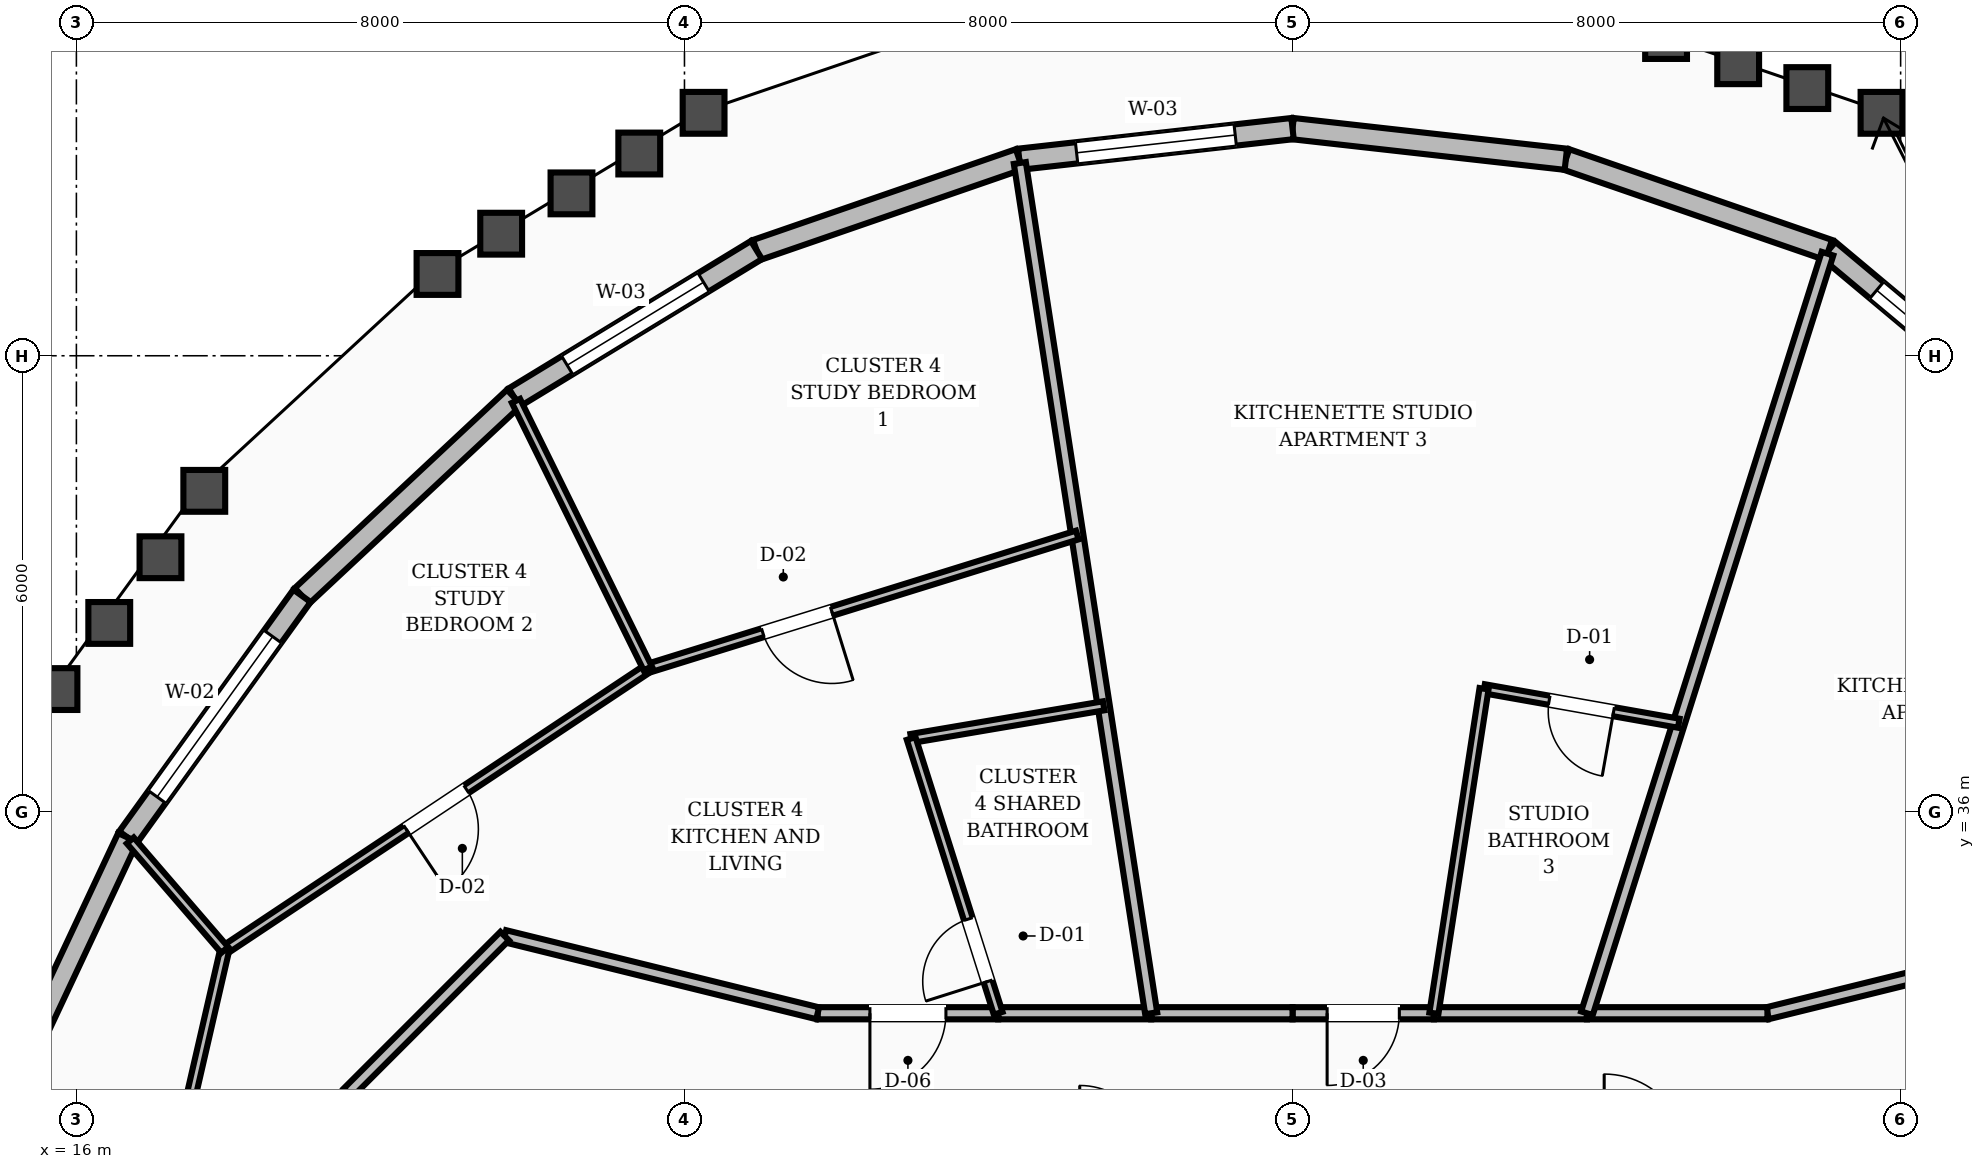
"""IFC4 building model, lengths in metres.
Left out: names, types, materials, properties, quantities, classifications, styles, units other than length and angle.
Written with IfcOpenShell. Run it as: python <this file> out.ifc"""

import sys

from ifc_helpers import new_model, si_unit, direction, frame, frame_2d, origin, place, context, subcontext, project, spatial, rectangle, extrude, element, fill, save


model = new_model("IFC4")
c1 = context("Model", 3, precision=1e-05, world=origin(), true_north=direction((0.0, 1.0)))
c2 = subcontext(c1, "Body", "Model", "MODEL_VIEW")
j1 = project(units=[si_unit("LENGTHUNIT", "METRE"), si_unit("PLANEANGLEUNIT", "RADIAN")], contexts=[c1])
p1 = place(None, origin())
s1 = spatial("IfcSite", under=j1, at=p1, CompositionType="ELEMENT")
p2 = place(p1, origin())
s2 = spatial("IfcBuilding", under=s1, at=p2, CompositionType="ELEMENT")
p3 = place(p2, frame((0.0, 0.0, 283.2)))
s3 = spatial("IfcBuildingStorey", under=s2, at=p3, CompositionType="ELEMENT", Elevation=283.2)
p4 = place(p3, frame((41.999, 40.927, 0.0), z_axis=(0.0, 0.0, 1.0), x_axis=(-0.767031932992, 0.641608925882, 0.0)))
e1 = element("IfcWall", 1, at=p4, inside=s3, PredefinedType="STANDARD", context=c2, shape_type="SweptSolid", body=[
    extrude(rectangle(XDim=3.841, YDim=0.28, at=frame_2d((1.92, 0.0))), origin(), (0.0, 0.0, 1.0), 2.88),
])
p5 = place(p4, frame((0.916, 0.0, 0.8)))
e2 = element("IfcOpeningElement", 2, at=p5, cuts=e1, PredefinedType="OPENING", context=c2, shape_type="SweptSolid", body=[
    extrude(rectangle(XDim=2.1, YDim=1.65, at=frame_2d((1.05, 0.825))), frame((0.0, 0.15, 0.0), z_axis=(0.0, -1.0, 0.0), x_axis=(1.0, 0.0, 0.0)), (0.0, 0.0, 1.0), 0.3),
])
p6 = place(p3, frame((39.053, 43.391, 0.0), z_axis=(0.0, 0.0, 1.0), x_axis=(-0.945189830933, 0.326521336976, 0.0)))
e3 = element("IfcWall", 3, at=p6, inside=s3, PredefinedType="STANDARD", context=c2, shape_type="SweptSolid", body=[
    extrude(rectangle(XDim=3.658, YDim=0.28, at=frame_2d((1.829, 0.0))), origin(), (0.0, 0.0, 1.0), 2.88),
])
p7 = place(p3, frame((35.595, 44.585, 0.0), z_axis=(0.0, 0.0, 1.0), x_axis=(-0.993767154633, 0.111475747909, 0.0)))
e4 = element("IfcWall", 4, at=p7, inside=s3, PredefinedType="STANDARD", context=c2, shape_type="SweptSolid", body=[
    extrude(rectangle(XDim=3.618, YDim=0.28, at=frame_2d((1.809, 0.0))), origin(), (0.0, 0.0, 1.0), 2.88),
])
p8 = place(p3, frame((32.0, 44.989, 0.0), z_axis=(0.0, 0.0, 1.0), x_axis=(-0.993767154633, -0.111475747909, 0.0)))
e5 = element("IfcWall", 5, at=p8, inside=s3, PredefinedType="STANDARD", context=c2, shape_type="SweptSolid", body=[
    extrude(rectangle(XDim=3.618, YDim=0.28, at=frame_2d((1.809, 0.0))), origin(), (0.0, 0.0, 1.0), 2.88),
])
p9 = place(p8, frame((0.759, 0.0, 0.8)))
e6 = element("IfcOpeningElement", 6, at=p9, cuts=e5, PredefinedType="OPENING", context=c2, shape_type="SweptSolid", body=[
    extrude(rectangle(XDim=2.1, YDim=1.65, at=frame_2d((1.05, 0.825))), frame((0.0, 0.15, 0.0), z_axis=(0.0, -1.0, 0.0), x_axis=(1.0, 0.0, 0.0)), (0.0, 0.0, 1.0), 0.3),
])
p10 = place(p3, frame((28.405, 44.585, 0.0), z_axis=(0.0, 0.0, 1.0), x_axis=(-0.945189830933, -0.326521336976, 0.0)))
e7 = element("IfcWall", 7, at=p10, inside=s3, PredefinedType="STANDARD", context=c2, shape_type="SweptSolid", body=[
    extrude(rectangle(XDim=3.658, YDim=0.28, at=frame_2d((1.829, 0.0))), origin(), (0.0, 0.0, 1.0), 2.88),
])
p11 = place(p3, frame((24.947, 43.391, 0.0), z_axis=(0.0, 0.0, 1.0), x_axis=(-0.854201083367, -0.519942794136, 0.0)))
e8 = element("IfcWall", 8, at=p11, inside=s3, PredefinedType="STANDARD", context=c2, shape_type="SweptSolid", body=[
    extrude(rectangle(XDim=3.73, YDim=0.28, at=frame_2d((1.865, 0.0))), origin(), (0.0, 0.0, 1.0), 2.88),
])
p12 = place(p11, frame((0.815, 0.0, 0.8)))
e9 = element("IfcOpeningElement", 9, at=p12, cuts=e8, PredefinedType="OPENING", context=c2, shape_type="SweptSolid", body=[
    extrude(rectangle(XDim=2.1, YDim=1.65, at=frame_2d((1.05, 0.825))), frame((0.0, 0.15, 0.0), z_axis=(0.0, -1.0, 0.0), x_axis=(1.0, 0.0, 0.0)), (0.0, 0.0, 1.0), 0.3),
])
p13 = place(p3, frame((21.761, 41.451, 0.0), z_axis=(0.0, 0.0, 1.0), x_axis=(-0.730558106244, -0.682850535184, 0.0)))
e10 = element("IfcWall", 10, at=p13, inside=s3, PredefinedType="STANDARD", context=c2, shape_type="SweptSolid", body=[
    extrude(rectangle(XDim=3.823, YDim=0.28, at=frame_2d((1.911, 0.0))), origin(), (0.0, 0.0, 1.0), 2.88),
])
p14 = place(p3, frame((18.968, 38.841, 0.0), z_axis=(0.0, 0.0, 1.0), x_axis=(-0.584655758142, -0.811281482884, 0.0)))
e11 = element("IfcWall", 11, at=p14, inside=s3, PredefinedType="STANDARD", context=c2, shape_type="SweptSolid", body=[
    extrude(rectangle(XDim=3.92, YDim=0.28, at=frame_2d((1.96, 0.0))), origin(), (0.0, 0.0, 1.0), 2.88),
])
p15 = place(p14, frame((0.66, 0.0, 0.8)))
e12 = element("IfcOpeningElement", 12, at=p15, cuts=e11, PredefinedType="OPENING", context=c2, shape_type="SweptSolid", body=[
    extrude(rectangle(XDim=2.6, YDim=1.65, at=frame_2d((1.3, 0.825))), frame((0.0, 0.15, 0.0), z_axis=(0.0, -1.0, 0.0), x_axis=(1.0, 0.0, 0.0)), (0.0, 0.0, 1.0), 0.3),
])
p16 = place(p3, frame((16.676, 35.661, 0.0), z_axis=(0.0, 0.0, 1.0), x_axis=(-0.424881672648, -0.905248896297, 0.0)))
e13 = element("IfcWall", 13, at=p16, inside=s3, PredefinedType="STANDARD", context=c2, shape_type="SweptSolid", body=[
    extrude(rectangle(XDim=4.009, YDim=0.28, at=frame_2d((2.004, 0.0))), origin(), (0.0, 0.0, 1.0), 2.88),
])
p17 = place(p3, frame((42.365, 34.365, 0.0), z_axis=(0.0, 0.0, 1.0), x_axis=(-0.970939799552, -0.239323850978, 0.0)))
e14 = element("IfcWall", 14, at=p17, inside=s3, PredefinedType="SOLIDWALL", context=c2, shape_type="SweptSolid", body=[
    extrude(rectangle(XDim=4.241, YDim=0.16, at=frame_2d((2.12, 0.0))), origin(), (0.0, 0.0, 1.0), 2.87),
])
p18 = place(p3, frame((38.248, 33.35, 0.0), z_axis=(0.0, 0.0, 1.0), x_axis=(-1.0, 0.0, 0.0)))
e15 = element("IfcWall", 15, at=p18, inside=s3, PredefinedType="SOLIDWALL", context=c2, shape_type="SweptSolid", body=[
    extrude(rectangle(XDim=2.375, YDim=0.16, at=frame_2d((1.188, 0.0))), origin(), (0.0, 0.0, 1.0), 2.87),
])
p19 = place(p3, frame((35.873, 33.35, 0.0), z_axis=(0.0, 0.0, 1.0), x_axis=(-1.0, 0.0, 0.0)))
e16 = element("IfcWall", 16, at=p19, inside=s3, PredefinedType="SOLIDWALL", context=c2, shape_type="SweptSolid", body=[
    extrude(rectangle(XDim=2.013, YDim=0.16, at=frame_2d((1.006, 0.0))), origin(), (0.0, 0.0, 1.0), 2.87),
])
p20 = place(p3, frame((33.86, 33.35, 0.0), z_axis=(0.0, 0.0, 1.0), x_axis=(-1.0, 0.0, 0.0)))
e17 = element("IfcWall", 17, at=p20, inside=s3, PredefinedType="SOLIDWALL", context=c2, shape_type="SweptSolid", body=[
    extrude(rectangle(XDim=1.86, YDim=0.16, at=frame_2d((0.93, 0.0))), origin(), (0.0, 0.0, 1.0), 2.87),
])
p21 = place(p20, frame((0.455, 0.0, 0.0)))
e18 = element("IfcOpeningElement", 18, at=p21, cuts=e17, PredefinedType="OPENING", context=c2, shape_type="SweptSolid", body=[
    extrude(rectangle(XDim=0.95, YDim=2.1, at=frame_2d((0.475, 1.05))), frame((0.0, 0.09, 0.0), z_axis=(0.0, -1.0, 0.0), x_axis=(1.0, 0.0, 0.0)), (0.0, 0.0, 1.0), 0.18),
])
p22 = place(p3, frame((32.0, 33.35, 0.0), z_axis=(0.0, 0.0, 1.0), x_axis=(-1.0, 0.0, 0.0)))
e19 = element("IfcWall", 19, at=p22, inside=s3, PredefinedType="SOLIDWALL", context=c2, shape_type="SweptSolid", body=[
    extrude(rectangle(XDim=1.86, YDim=0.16, at=frame_2d((0.93, 0.0))), origin(), (0.0, 0.0, 1.0), 2.87),
])
p23 = place(p3, frame((30.14, 33.35, 0.0), z_axis=(0.0, 0.0, 1.0), x_axis=(-1.0, 0.0, 0.0)))
e20 = element("IfcWall", 20, at=p23, inside=s3, PredefinedType="SOLIDWALL", context=c2, shape_type="SweptSolid", body=[
    extrude(rectangle(XDim=2.013, YDim=0.16, at=frame_2d((1.006, 0.0))), origin(), (0.0, 0.0, 1.0), 2.87),
])
p24 = place(p3, frame((28.127, 33.35, 0.0), z_axis=(0.0, 0.0, 1.0), x_axis=(-1.0, 0.0, 0.0)))
e21 = element("IfcWall", 21, at=p24, inside=s3, PredefinedType="SOLIDWALL", context=c2, shape_type="SweptSolid", body=[
    extrude(rectangle(XDim=2.375, YDim=0.16, at=frame_2d((1.188, 0.0))), origin(), (0.0, 0.0, 1.0), 2.87),
])
p25 = place(p24, frame((0.687, 0.0, 0.0)))
e22 = element("IfcOpeningElement", 22, at=p25, cuts=e21, PredefinedType="OPENING", context=c2, shape_type="SweptSolid", body=[
    extrude(rectangle(XDim=1.0, YDim=2.1, at=frame_2d((0.5, 1.05))), frame((0.0, 0.09, 0.0), z_axis=(0.0, -1.0, 0.0), x_axis=(1.0, 0.0, 0.0)), (0.0, 0.0, 1.0), 0.18),
])
p26 = place(p3, frame((25.752, 33.35, 0.0), z_axis=(0.0, 0.0, 1.0), x_axis=(-0.970939799552, 0.239323850978, 0.0)))
e23 = element("IfcWall", 23, at=p26, inside=s3, PredefinedType="SOLIDWALL", context=c2, shape_type="SweptSolid", body=[
    extrude(rectangle(XDim=4.241, YDim=0.16, at=frame_2d((2.12, 0.0))), origin(), (0.0, 0.0, 1.0), 2.87),
])
p27 = place(p3, frame((21.635, 34.365, 0.0), z_axis=(0.0, 0.0, 1.0), x_axis=(-0.707106781187, -0.707106781187, 0.0)))
e24 = element("IfcWall", 24, at=p27, inside=s3, PredefinedType="SOLIDWALL", context=c2, shape_type="SweptSolid", body=[
    extrude(rectangle(XDim=2.916, YDim=0.16, at=frame_2d((1.458, 0.0))), origin(), (0.0, 0.0, 1.0), 2.87),
])
p28 = place(p3, frame((35.873, 33.35, 0.0), z_axis=(0.0, 0.0, 1.0), x_axis=(0.301923810038, 0.953332058064, 0.0)))
e25 = element("IfcWall", 25, at=p28, inside=s3, PredefinedType="SOLIDWALL", context=c2, shape_type="SweptSolid", body=[
    extrude(rectangle(XDim=10.482, YDim=0.16, at=frame_2d((5.241, 0.0))), origin(), (0.0, 0.0, 1.0), 2.87),
])
p29 = place(p3, frame((37.081, 37.166, 0.0), z_axis=(0.0, 0.0, 1.0), x_axis=(-0.984669047574, 0.174432986415, 0.0)))
e26 = element("IfcWall", 26, at=p29, inside=s3, PredefinedType="PARTITIONING", context=c2, shape_type="SweptSolid", body=[
    extrude(rectangle(XDim=2.602, YDim=0.12, at=frame_2d((1.301, 0.0))), origin(), (0.0, 0.0, 1.0), 2.87),
])
p30 = place(p29, frame((0.871, 0.0, 0.0)))
e27 = element("IfcOpeningElement", 27, at=p30, cuts=e26, PredefinedType="OPENING", context=c2, shape_type="SweptSolid", body=[
    extrude(rectangle(XDim=0.86, YDim=2.1, at=frame_2d((0.43, 1.05))), frame((0.0, 0.07, 0.0), z_axis=(0.0, -1.0, 0.0), x_axis=(1.0, 0.0, 0.0)), (0.0, 0.0, 1.0), 0.14),
])
p31 = place(p3, frame((33.86, 33.35, 0.0), z_axis=(0.0, 0.0, 1.0), x_axis=(0.152647462941, 0.988280705092, 0.0)))
e28 = element("IfcWall", 28, at=p31, inside=s3, PredefinedType="PARTITIONING", context=c2, shape_type="SweptSolid", body=[
    extrude(rectangle(XDim=4.32, YDim=0.12, at=frame_2d((2.16, 0.0))), origin(), (0.0, 0.0, 1.0), 2.87),
])
p32 = place(p3, frame((30.14, 33.35, 0.0), z_axis=(0.0, 0.0, 1.0), x_axis=(-0.152673086736, 0.988276746962, 0.0)))
e29 = element("IfcWall", 29, at=p32, inside=s3, PredefinedType="SOLIDWALL", context=c2, shape_type="SweptSolid", body=[
    extrude(rectangle(XDim=11.318, YDim=0.16, at=frame_2d((5.659, 0.0))), origin(), (0.0, 0.0, 1.0), 2.87),
])
p33 = place(p3, frame((29.515, 37.395, 0.0), z_axis=(0.0, 0.0, 1.0), x_axis=(-0.985883309276, -0.167433869007, 0.0)))
e30 = element("IfcWall", 30, at=p33, inside=s3, PredefinedType="PARTITIONING", context=c2, shape_type="SweptSolid", body=[
    extrude(rectangle(XDim=2.569, YDim=0.12, at=frame_2d((1.285, 0.0))), origin(), (0.0, 0.0, 1.0), 2.87),
])
p34 = place(p3, frame((28.127, 33.35, 0.0), z_axis=(0.0, 0.0, 1.0), x_axis=(-0.301935597146, 0.953328324963, 0.0)))
e31 = element("IfcWall", 31, at=p34, inside=s3, PredefinedType="PARTITIONING", context=c2, shape_type="SweptSolid", body=[
    extrude(rectangle(XDim=3.792, YDim=0.12, at=frame_2d((1.896, 0.0))), origin(), (0.0, 0.0, 1.0), 2.87),
])
p35 = place(p34, frame((0.44, 0.0, 0.0)))
e32 = element("IfcOpeningElement", 32, at=p35, cuts=e31, PredefinedType="OPENING", context=c2, shape_type="SweptSolid", body=[
    extrude(rectangle(XDim=0.86, YDim=2.1, at=frame_2d((0.43, 1.05))), frame((0.0, 0.07, 0.0), z_axis=(0.0, -1.0, 0.0), x_axis=(1.0, 0.0, 0.0)), (0.0, 0.0, 1.0), 0.14),
])
p36 = place(p3, frame((29.168, 39.642, 0.0), z_axis=(0.0, 0.0, 1.0), x_axis=(-0.95500853958, -0.29657830219, 0.0)))
e33 = element("IfcWall", 33, at=p36, inside=s3, PredefinedType="PARTITIONING", context=c2, shape_type="SweptSolid", body=[
    extrude(rectangle(XDim=5.917, YDim=0.12, at=frame_2d((2.958, 0.0))), origin(), (0.0, 0.0, 1.0), 2.87),
])
p37 = place(p36, frame((3.383, 0.0, 0.0)))
e34 = element("IfcOpeningElement", 34, at=p37, cuts=e33, PredefinedType="OPENING", context=c2, shape_type="SweptSolid", body=[
    extrude(rectangle(XDim=0.95, YDim=2.1, at=frame_2d((0.475, 1.05))), frame((0.0, 0.07, 0.0), z_axis=(0.0, -1.0, 0.0), x_axis=(1.0, 0.0, 0.0)), (0.0, 0.0, 1.0), 0.14),
])
p38 = place(p3, frame((23.517, 37.887, 0.0), z_axis=(0.0, 0.0, 1.0), x_axis=(-0.832572389716, -0.553916253492, 0.0)))
e35 = element("IfcWall", 35, at=p38, inside=s3, PredefinedType="PARTITIONING", context=c2, shape_type="SweptSolid", body=[
    extrude(rectangle(XDim=6.686, YDim=0.12, at=frame_2d((3.343, 0.0))), origin(), (0.0, 0.0, 1.0), 2.87),
])
p39 = place(p38, frame((2.868, 0.0, 0.0)))
e36 = element("IfcOpeningElement", 36, at=p39, cuts=e35, PredefinedType="OPENING", context=c2, shape_type="SweptSolid", body=[
    extrude(rectangle(XDim=0.95, YDim=2.1, at=frame_2d((0.475, 1.05))), frame((0.0, 0.07, 0.0), z_axis=(0.0, -1.0, 0.0), x_axis=(1.0, 0.0, 0.0)), (0.0, 0.0, 1.0), 0.14),
])
p40 = place(p3, frame((23.517, 37.887, 0.0), z_axis=(0.0, 0.0, 1.0), x_axis=(-0.441954450459, 0.897037492928, 0.0)))
e37 = element("IfcWall", 37, at=p40, inside=s3, PredefinedType="PARTITIONING", context=c2, shape_type="SweptSolid", body=[
    extrude(rectangle(XDim=3.924, YDim=0.12, at=frame_2d((1.962, 0.0))), origin(), (0.0, 0.0, 1.0), 2.87),
])
p41 = place(p3, frame((17.951, 34.183, 0.0), z_axis=(0.0, 0.0, 1.0), x_axis=(-0.224269016803, -0.97452727417, 0.0)))
e38 = element("IfcWall", 38, at=p41, inside=s3, PredefinedType="PARTITIONING", context=c2, shape_type="SweptSolid", body=[
    extrude(rectangle(XDim=6.976, YDim=0.12, at=frame_2d((3.488, 0.0))), origin(), (0.0, 0.0, 1.0), 2.87),
])
p42 = place(p41, frame((3.013, 0.0, 0.0)))
e39 = element("IfcOpeningElement", 39, at=p42, cuts=e38, PredefinedType="OPENING", context=c2, shape_type="SweptSolid", body=[
    extrude(rectangle(XDim=0.95, YDim=2.1, at=frame_2d((0.475, 1.05))), frame((0.0, 0.07, 0.0), z_axis=(0.0, -1.0, 0.0), x_axis=(1.0, 0.0, 0.0)), (0.0, 0.0, 1.0), 0.14),
])
p43 = place(p3, frame((17.951, 34.183, 0.0), z_axis=(0.0, 0.0, 1.0), x_axis=(-0.653252022003, 0.757140538968, 0.0)))
e40 = element("IfcWall", 40, at=p43, inside=s3, PredefinedType="PARTITIONING", context=c2, shape_type="SweptSolid", body=[
    extrude(rectangle(XDim=1.901, YDim=0.12, at=frame_2d((0.951, 0.0))), origin(), (0.0, 0.0, 1.0), 2.87),
])
p44 = place(p5, origin())
e41 = element("IfcWindow", 41, at=p44, inside=s3, PartitioningType="SINGLE_PANEL", PredefinedType="WINDOW", context=c2, shape_type="SweptSolid", body=[
    extrude(rectangle(XDim=2.1, YDim=1.65, at=frame_2d((1.05, 0.825))), frame((0.0, 0.03, 0.0), z_axis=(0.0, -1.0, 0.0), x_axis=(1.0, 0.0, 0.0)), (0.0, 0.0, 1.0), 0.06),
])
fill(e2, e41)
p45 = place(p9, origin())
e42 = element("IfcWindow", 42, at=p45, inside=s3, PartitioningType="SINGLE_PANEL", PredefinedType="WINDOW", context=c2, shape_type="SweptSolid", body=[
    extrude(rectangle(XDim=2.1, YDim=1.65, at=frame_2d((1.05, 0.825))), frame((0.0, 0.03, 0.0), z_axis=(0.0, -1.0, 0.0), x_axis=(1.0, 0.0, 0.0)), (0.0, 0.0, 1.0), 0.06),
])
fill(e6, e42)
p46 = place(p12, origin())
e43 = element("IfcWindow", 43, at=p46, inside=s3, PartitioningType="SINGLE_PANEL", PredefinedType="WINDOW", context=c2, shape_type="SweptSolid", body=[
    extrude(rectangle(XDim=2.1, YDim=1.65, at=frame_2d((1.05, 0.825))), frame((0.0, 0.03, 0.0), z_axis=(0.0, -1.0, 0.0), x_axis=(1.0, 0.0, 0.0)), (0.0, 0.0, 1.0), 0.06),
])
fill(e9, e43)
p47 = place(p15, origin())
e44 = element("IfcWindow", 44, at=p47, inside=s3, PartitioningType="SINGLE_PANEL", PredefinedType="WINDOW", context=c2, shape_type="SweptSolid", body=[
    extrude(rectangle(XDim=2.6, YDim=1.65, at=frame_2d((1.3, 0.825))), frame((0.0, 0.03, 0.0), z_axis=(0.0, -1.0, 0.0), x_axis=(1.0, 0.0, 0.0)), (0.0, 0.0, 1.0), 0.06),
])
fill(e12, e44)
p48 = place(p30, origin())
e45 = element("IfcDoor", 45, at=p48, inside=s3, OperationType="SINGLE_SWING_LEFT", PredefinedType="DOOR", context=c2, shape_type="SweptSolid", body=[
    extrude(rectangle(XDim=0.86, YDim=2.1, at=frame_2d((0.43, 1.05))), frame((0.0, 0.025, 0.0), z_axis=(0.0, -1.0, 0.0), x_axis=(1.0, 0.0, 0.0)), (0.0, 0.0, 1.0), 0.05),
])
fill(e27, e45)
p49 = place(p21, origin())
e46 = element("IfcDoor", 46, at=p49, inside=s3, OperationType="SINGLE_SWING_RIGHT", PredefinedType="DOOR", context=c2, shape_type="SweptSolid", body=[
    extrude(rectangle(XDim=0.95, YDim=2.1, at=frame_2d((0.475, 1.05))), frame((0.0, 0.025, 0.0), z_axis=(0.0, -1.0, 0.0), x_axis=(1.0, 0.0, 0.0)), (0.0, 0.0, 1.0), 0.05),
])
fill(e18, e46)
p50 = place(p35, origin())
e47 = element("IfcDoor", 47, at=p50, inside=s3, OperationType="SINGLE_SWING_LEFT", PredefinedType="DOOR", context=c2, shape_type="SweptSolid", body=[
    extrude(rectangle(XDim=0.86, YDim=2.1, at=frame_2d((0.43, 1.05))), frame((0.0, 0.025, 0.0), z_axis=(0.0, -1.0, 0.0), x_axis=(1.0, 0.0, 0.0)), (0.0, 0.0, 1.0), 0.05),
])
fill(e32, e47)
p51 = place(p25, origin())
e48 = element("IfcDoor", 48, at=p51, inside=s3, OperationType="SINGLE_SWING_RIGHT", PredefinedType="DOOR", context=c2, shape_type="SweptSolid", body=[
    extrude(rectangle(XDim=1.0, YDim=2.1, at=frame_2d((0.5, 1.05))), frame((0.0, 0.025, 0.0), z_axis=(0.0, -1.0, 0.0), x_axis=(1.0, 0.0, 0.0)), (0.0, 0.0, 1.0), 0.05),
])
fill(e22, e48)
p52 = place(p37, origin())
e49 = element("IfcDoor", 49, at=p52, inside=s3, OperationType="SINGLE_SWING_LEFT", PredefinedType="DOOR", context=c2, shape_type="SweptSolid", body=[
    extrude(rectangle(XDim=0.95, YDim=2.1, at=frame_2d((0.475, 1.05))), frame((0.0, 0.025, 0.0), z_axis=(0.0, -1.0, 0.0), x_axis=(1.0, 0.0, 0.0)), (0.0, 0.0, 1.0), 0.05),
])
fill(e34, e49)
p53 = place(p39, origin())
e50 = element("IfcDoor", 50, at=p53, inside=s3, OperationType="SINGLE_SWING_RIGHT", PredefinedType="DOOR", context=c2, shape_type="SweptSolid", body=[
    extrude(rectangle(XDim=0.95, YDim=2.1, at=frame_2d((0.475, 1.05))), frame((0.0, 0.025, 0.0), z_axis=(0.0, -1.0, 0.0), x_axis=(1.0, 0.0, 0.0)), (0.0, 0.0, 1.0), 0.05),
])
fill(e36, e50)
save(model, sys.argv[1])
